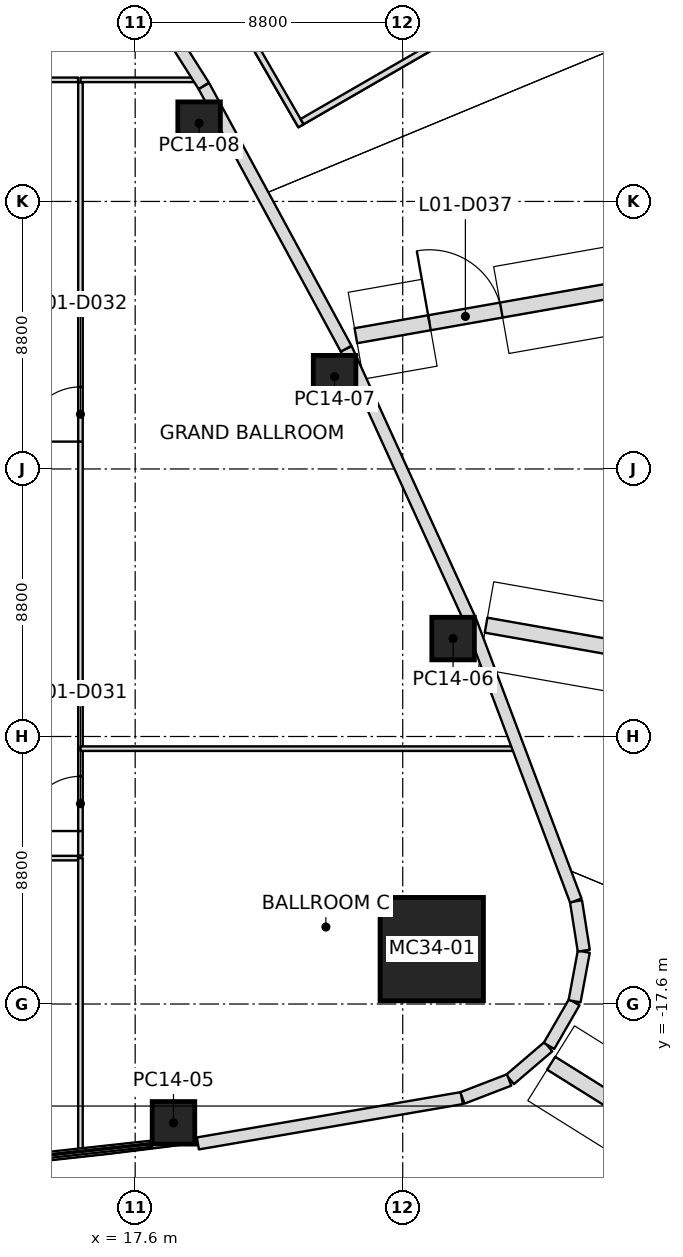
"""IFC4 building model, lengths in metres.
Left out: names, types, materials, properties, quantities, classifications, styles, units other than length and angle.
Written with IfcOpenShell. Run it as: python <this file> out.ifc"""

import sys

from ifc_helpers import new_model, si_unit, direction, frame, frame_2d, origin, origin_2d, place, context, subcontext, project, spatial, rectangle, extrude, element, fill, save


model = new_model("IFC4")
c1 = context("Model", 3, precision=1e-05, world=origin(), true_north=direction((0.0, 1.0)))
c2 = subcontext(c1, "Body", "Model", "MODEL_VIEW")
j1 = project(units=[si_unit("LENGTHUNIT", "METRE"), si_unit("PLANEANGLEUNIT", "RADIAN")], contexts=[c1])
p1 = place(None, origin())
s1 = spatial("IfcSite", under=j1, at=p1, CompositionType="ELEMENT")
p2 = place(p1, origin())
s2 = spatial("IfcBuilding", under=s1, at=p2, CompositionType="ELEMENT")
p3 = place(p2, frame((0.0, 0.0, 9.0)))
s3 = spatial("IfcBuildingStorey", under=s2, at=p3, CompositionType="ELEMENT", Elevation=9.0)
p4 = place(p3, frame((27.355, -15.793, 0.0), z_axis=(0.0, 0.0, 1.0), x_axis=(1.0, 0.0, 0.0)))
e1 = element("IfcColumn", 1, at=p4, inside=s3, PredefinedType="COLUMN", context=c2, shape_type="SweptSolid", body=[
    extrude(rectangle(XDim=3.4, YDim=3.4, at=origin_2d()), origin(), (0.0, 0.0, 1.0), 7.8),
])
for number, where, z_axis, x_axis in (
    (2, (18.86, -21.508, 0.0), (0.0, 0.0, 1.0), (0.991, 0.131, 0.0)),
    (3, (28.057, -5.579, 0.0), (0.0, 0.0, 1.0), (-0.382, 0.924, 0.0)),
    (4, (24.158, 3.035, 0.0), (0.0, 0.0, 1.0), (-0.442, 0.897, 0.0)),
    (5, (19.702, 11.375, 0.0), (0.0, 0.0, 1.0), (-0.5, 0.866, 0.0)),
):
    element("IfcColumn", number, at=place(p3, frame(where, z_axis=z_axis, x_axis=x_axis)), inside=s3, PredefinedType="COLUMN", context=c2, shape_type="SweptSolid", body=[
        extrude(rectangle(XDim=1.4, YDim=1.4, at=origin_2d()), origin(), (0.0, 0.0, 1.0), 7.8),
    ])
p5 = place(p3, frame((24.859, 4.383, -0.06), z_axis=(0.0, 0.0, 1.0), x_axis=(0.984806552883, 0.173654983803, 0.0)))
e6 = element("IfcWall", 6, at=p5, inside=s3, PredefinedType="STANDARD", context=c2, shape_type="SweptSolid", body=[
    extrude(rectangle(XDim=8.868, YDim=0.5, at=frame_2d((4.434, 0.0))), origin(), (0.0, 0.0, 1.0), 9.06),
])
p6 = place(p5, frame((2.458, 0.0, 0.06)))
e7 = element("IfcOpeningElement", 7, at=p6, cuts=e6, PredefinedType="OPENING", context=c2, shape_type="SweptSolid", body=[
    extrude(rectangle(XDim=2.4, YDim=3.0, at=frame_2d((1.2, 1.5))), frame((0.0, 0.25, 0.0), z_axis=(0.0, -1.0, 0.0), x_axis=(1.0, 0.0, 0.0)), (0.0, 0.0, 1.0), 0.5),
])
p7 = place(p3, frame((31.282, -19.547, -0.06), z_axis=(0.0, 0.0, 1.0), x_axis=(0.848049126922, -0.52991761466, 0.0)))
e8 = element("IfcWall", 8, at=p7, inside=s3, PredefinedType="STANDARD", context=c2, shape_type="SweptSolid", body=[
    extrude(rectangle(XDim=11.874, YDim=0.5, at=frame_2d((5.937, 0.0))), origin(), (0.0, 0.0, 1.0), 9.06),
])
p8 = place(p7, frame((3.6, 0.0, 0.06)))
e9 = element("IfcOpeningElement", 9, at=p8, cuts=e8, PredefinedType="OPENING", context=c2, shape_type="SweptSolid", body=[
    extrude(rectangle(XDim=2.4, YDim=3.0, at=frame_2d((1.2, 1.5))), frame((0.0, 0.25, 0.0), z_axis=(0.0, -1.0, 0.0), x_axis=(1.0, 0.0, 0.0)), (0.0, 0.0, 1.0), 0.5),
])
p9 = place(p3, frame((29.142, -5.138, -0.06), z_axis=(0.0, 0.0, 1.0), x_axis=(0.984807275936, -0.17365088328, 0.0)))
e10 = element("IfcWall", 10, at=p9, inside=s3, PredefinedType="STANDARD", context=c2, shape_type="SweptSolid", body=[
    extrude(rectangle(XDim=10.048, YDim=0.5, at=frame_2d((5.024, 0.0))), origin(), (0.0, 0.0, 1.0), 7.06),
])
p10 = place(p9, frame((4.436, 0.0, 0.06)))
e11 = element("IfcOpeningElement", 11, at=p10, cuts=e10, PredefinedType="OPENING", context=c2, shape_type="SweptSolid", body=[
    extrude(rectangle(XDim=2.4, YDim=3.0, at=frame_2d((1.2, 1.5))), frame((0.0, 0.25, 0.0), z_axis=(0.0, -1.0, 0.0), x_axis=(1.0, 0.0, 0.0)), (0.0, 0.0, 1.0), 0.5),
])
p11 = place(p3, frame((21.303, 14.32, 0.18), z_axis=(0.0, 0.0, 1.0), x_axis=(0.500062588897, -0.865989265052, 0.0)))
e12 = element("IfcWall", 12, at=p11, inside=s3, PredefinedType="STANDARD", context=c2, shape_type="SweptSolid", body=[
    extrude(rectangle(XDim=3.5, YDim=0.2, at=frame_2d((1.75, 0.0))), origin(), (0.0, 0.0, 1.0), 0.3),
])
p12 = place(p3, frame((23.09, 11.426, 0.18), z_axis=(0.0, 0.0, 1.0), x_axis=(0.866034573852, 0.49998411664, 0.0)))
e13 = element("IfcWall", 13, at=p12, inside=s3, PredefinedType="STANDARD", context=c2, shape_type="SweptSolid", body=[
    extrude(rectangle(XDim=5.6, YDim=0.2, at=frame_2d((2.8, 0.0))), origin(), (0.0, 0.0, 1.0), 0.3),
])
for number, where, z_axis, x_axis in (
    (14, (31.19, -19.003, 0.0), (0.0, 0.0, 1.0), (-0.76, -0.65, 0.0)),
    (15, (32.041, -17.541, 0.0), (0.0, 0.0, 1.0), (-0.5, -0.866, 0.0)),
    (16, (32.355, -15.878, 0.0), (0.0, 0.0, 1.0), (-0.183, -0.983, 0.0)),
):
    element("IfcWall", number, at=place(p3, frame(where, z_axis=z_axis, x_axis=x_axis)), inside=s3, PredefinedType="STANDARD", context=c2, shape_type="SweptSolid", body=[
        extrude(rectangle(XDim=1.659, YDim=0.4, at=frame_2d((0.829, 0.0))), origin(), (0.0, 0.0, 1.0), 6.9),
    ])
p13 = place(p3, frame((32.099, -14.219, 0.0), z_axis=(0.0, 0.0, 1.0), x_axis=(0.155711266073, -0.98780261268, 0.0)))
e17 = element("IfcWall", 17, at=p13, inside=s3, PredefinedType="STANDARD", context=c2, shape_type="SweptSolid", body=[
    extrude(rectangle(XDim=1.646, YDim=0.4, at=frame_2d((0.823, 0.0))), origin(), (0.0, 0.0, 1.0), 6.9),
])
p14 = place(p3, frame((28.625, -4.993, 0.0), z_axis=(0.0, 0.0, 1.0), x_axis=(0.352569865932, -0.935785493389, 0.0)))
e18 = element("IfcWall", 18, at=p14, inside=s3, PredefinedType="STANDARD", context=c2, shape_type="SweptSolid", body=[
    extrude(rectangle(XDim=9.838, YDim=0.4, at=frame_2d((4.919, 0.0))), origin(), (0.0, 0.0, 1.0), 6.9),
])
p15 = place(p3, frame((24.541, 3.951, 0.0), z_axis=(0.0, 0.0, 1.0), x_axis=(0.415399179946, -0.909639225902, 0.0)))
e19 = element("IfcWall", 19, at=p15, inside=s3, PredefinedType="STANDARD", context=c2, shape_type="SweptSolid", body=[
    extrude(rectangle(XDim=9.826, YDim=0.4, at=frame_2d((4.913, 0.0))), origin(), (0.0, 0.0, 1.0), 6.9),
])
p16 = place(p3, frame((19.859, 12.597, 0.0), z_axis=(0.0, 0.0, 1.0), x_axis=(0.476254331716, -0.879307575039, 0.0)))
e20 = element("IfcWall", 20, at=p16, inside=s3, PredefinedType="STANDARD", context=c2, shape_type="SweptSolid", body=[
    extrude(rectangle(XDim=9.825, YDim=0.4, at=frame_2d((4.913, 0.0))), origin(), (0.0, 0.0, 1.0), 6.9),
])
p17 = place(p3, frame((14.599, 20.905, 0.0), z_axis=(0.0, 0.0, 1.0), x_axis=(0.534912566476, -0.844907418731, 0.0)))
e21 = element("IfcWall", 21, at=p17, inside=s3, PredefinedType="STANDARD", context=c2, shape_type="SweptSolid", body=[
    extrude(rectangle(XDim=9.826, YDim=0.4, at=frame_2d((4.913, 0.0))), origin(), (0.0, 0.0, 1.0), 6.9),
])
p18 = place(p3, frame((28.344, -20.695, 0.0), z_axis=(0.0, 0.0, 1.0), x_axis=(-0.985570785174, -0.169263780566, 0.0)))
e22 = element("IfcWall", 22, at=p18, inside=s3, PredefinedType="STANDARD", context=c2, shape_type="SweptSolid", body=[
    extrude(rectangle(XDim=8.81, YDim=0.4, at=frame_2d((4.405, 0.0))), origin(), (0.0, 0.0, 1.0), 6.9),
])
p19 = place(p3, frame((29.9, -20.098, 0.0), z_axis=(0.0, 0.0, 1.0), x_axis=(-0.933315023429, -0.359058584415, 0.0)))
e23 = element("IfcWall", 23, at=p19, inside=s3, PredefinedType="STANDARD", context=c2, shape_type="SweptSolid", body=[
    extrude(rectangle(XDim=1.646, YDim=0.4, at=frame_2d((0.823, 0.0))), origin(), (0.0, 0.0, 1.0), 6.9),
])
p20 = place(p3, frame((15.8, -12.8, 0.0), z_axis=(0.0, 0.0, 1.0), x_axis=(0.0, -1.0, 0.0)))
e24 = element("IfcWall", 24, at=p20, inside=s3, PredefinedType="PARTITIONING", context=c2, shape_type="SweptSolid", body=[
    extrude(rectangle(XDim=9.71, YDim=0.15, at=frame_2d((4.855, 0.0))), origin(), (0.0, 0.0, 1.0), 6.934),
])
p21 = place(p3, frame((15.8, -9.2, 0.0), z_axis=(0.0, 0.0, 1.0), x_axis=(1.0, 0.0, 0.0)))
e25 = element("IfcWall", 25, at=p21, inside=s3, PredefinedType="PARTITIONING", context=c2, shape_type="SweptSolid", body=[
    extrude(rectangle(XDim=14.368, YDim=0.15, at=frame_2d((7.184, 0.0))), origin(), (0.0, 0.0, 1.0), 6.934),
])
p22 = place(p3, frame((19.598, 12.8, 0.0), z_axis=(0.0, 0.0, 1.0), x_axis=(-1.0, 0.0, 0.0)))
e26 = element("IfcWall", 26, at=p22, inside=s3, PredefinedType="PARTITIONING", context=c2, shape_type="SweptSolid", body=[
    extrude(rectangle(XDim=3.798, YDim=0.15, at=frame_2d((1.899, 0.0))), origin(), (0.0, 0.0, 1.0), 6.934),
])
p23 = place(p3, frame((-15.72, -12.8, 0.0), z_axis=(0.0, 0.0, 1.0), x_axis=(1.0, 0.0, 0.0)))
e27 = element("IfcWall", 27, at=p23, inside=s3, PredefinedType="PARTITIONING", context=c2, shape_type="SweptSolid", body=[
    extrude(rectangle(XDim=31.44, YDim=0.15, at=frame_2d((15.72, 0.0))), origin(), (0.0, 0.0, 1.0), 6.947),
])
p24 = place(p23, frame((1.52, 0.0, 0.0)))
e28 = element("IfcOpeningElement", 28, at=p24, cuts=e27, PredefinedType="OPENING", context=c2, shape_type="SweptSolid", body=[
    extrude(rectangle(XDim=1.0, YDim=2.1, at=frame_2d((0.5, 1.05))), frame((0.0, 0.075, 0.0), z_axis=(0.0, -1.0, 0.0), x_axis=(1.0, 0.0, 0.0)), (0.0, 0.0, 1.0), 0.15),
])
p25 = place(p23, frame((6.37, 0.0, 0.0)))
e29 = element("IfcOpeningElement", 29, at=p25, cuts=e27, PredefinedType="OPENING", context=c2, shape_type="SweptSolid", body=[
    extrude(rectangle(XDim=1.0, YDim=2.1, at=frame_2d((0.5, 1.05))), frame((0.0, 0.075, 0.0), z_axis=(0.0, -1.0, 0.0), x_axis=(1.0, 0.0, 0.0)), (0.0, 0.0, 1.0), 0.15),
])
p26 = place(p23, frame((20.02, 0.0, 0.0)))
e30 = element("IfcOpeningElement", 30, at=p26, cuts=e27, PredefinedType="OPENING", context=c2, shape_type="SweptSolid", body=[
    extrude(rectangle(XDim=1.0, YDim=2.1, at=frame_2d((0.5, 1.05))), frame((0.0, 0.075, 0.0), z_axis=(0.0, -1.0, 0.0), x_axis=(1.0, 0.0, 0.0)), (0.0, 0.0, 1.0), 0.15),
])
p27 = place(p3, frame((15.72, 12.8, 0.0), z_axis=(0.0, 0.0, 1.0), x_axis=(-1.0, 0.0, 0.0)))
e31 = element("IfcWall", 31, at=p27, inside=s3, PredefinedType="PARTITIONING", context=c2, shape_type="SweptSolid", body=[
    extrude(rectangle(XDim=31.44, YDim=0.15, at=frame_2d((15.72, 0.0))), origin(), (0.0, 0.0, 1.0), 6.647),
])
p28 = place(p27, frame((6.92, 0.0, 0.0)))
e32 = element("IfcOpeningElement", 32, at=p28, cuts=e31, PredefinedType="OPENING", context=c2, shape_type="SweptSolid", body=[
    extrude(rectangle(XDim=1.0, YDim=2.1, at=frame_2d((0.5, 1.05))), frame((0.0, 0.075, 0.0), z_axis=(0.0, -1.0, 0.0), x_axis=(1.0, 0.0, 0.0)), (0.0, 0.0, 1.0), 0.15),
])
p29 = place(p27, frame((1.66, 0.0, 0.0)))
e33 = element("IfcOpeningElement", 33, at=p29, cuts=e31, PredefinedType="OPENING", context=c2, shape_type="SweptSolid", body=[
    extrude(rectangle(XDim=1.8, YDim=2.1, at=frame_2d((0.9, 1.05))), frame((0.0, 0.075, 0.0), z_axis=(0.0, -1.0, 0.0), x_axis=(1.0, 0.0, 0.0)), (0.0, 0.0, 1.0), 0.15),
])
p30 = place(p27, frame((19.33, 0.0, 0.0)))
e34 = element("IfcOpeningElement", 34, at=p30, cuts=e31, PredefinedType="OPENING", context=c2, shape_type="SweptSolid", body=[
    extrude(rectangle(XDim=2.4, YDim=2.1, at=frame_2d((1.2, 1.05))), frame((0.0, 0.075, 0.0), z_axis=(0.0, -1.0, 0.0), x_axis=(1.0, 0.0, 0.0)), (0.0, 0.0, 1.0), 0.15),
])
p31 = place(p3, frame((15.8, -12.72, 0.0), z_axis=(0.0, 0.0, 1.0), x_axis=(0.0, 1.0, 0.0)))
e35 = element("IfcWall", 35, at=p31, inside=s3, PredefinedType="PARTITIONING", context=c2, shape_type="SweptSolid", body=[
    extrude(rectangle(XDim=25.44, YDim=0.15, at=frame_2d((12.72, 0.0))), origin(), (0.0, 0.0, 1.0), 6.647),
])
p32 = place(p31, frame((0.81, 0.0, 0.0)))
e36 = element("IfcOpeningElement", 36, at=p32, cuts=e35, PredefinedType="OPENING", context=c2, shape_type="SweptSolid", body=[
    extrude(rectangle(XDim=1.8, YDim=2.1, at=frame_2d((0.9, 1.05))), frame((0.0, 0.075, 0.0), z_axis=(0.0, -1.0, 0.0), x_axis=(1.0, 0.0, 0.0)), (0.0, 0.0, 1.0), 0.15),
])
p33 = place(p31, frame((13.62, 0.0, 0.0)))
e37 = element("IfcOpeningElement", 37, at=p33, cuts=e35, PredefinedType="OPENING", context=c2, shape_type="SweptSolid", body=[
    extrude(rectangle(XDim=1.8, YDim=2.1, at=frame_2d((0.9, 1.05))), frame((0.0, 0.075, 0.0), z_axis=(0.0, -1.0, 0.0), x_axis=(1.0, 0.0, 0.0)), (0.0, 0.0, 1.0), 0.15),
])
p34 = place(p6, origin())
e38 = element("IfcDoor", 38, at=p34, inside=s3, OperationType="DOUBLE_DOOR_SINGLE_SWING", PredefinedType="DOOR", context=c2, shape_type="SweptSolid", body=[
    extrude(rectangle(XDim=2.4, YDim=3.0, at=frame_2d((1.2, 1.5))), frame((0.0, 0.025, 0.0), z_axis=(0.0, -1.0, 0.0), x_axis=(1.0, 0.0, 0.0)), (0.0, 0.0, 1.0), 0.05),
])
fill(e7, e38)
p35 = place(p32, origin())
e39 = element("IfcDoor", 39, at=p35, inside=s3, OperationType="DOUBLE_DOOR_SINGLE_SWING", PredefinedType="DOOR", context=c2, shape_type="SweptSolid", body=[
    extrude(rectangle(XDim=1.8, YDim=2.1, at=frame_2d((0.9, 1.05))), frame((0.0, 0.025, 0.0), z_axis=(0.0, -1.0, 0.0), x_axis=(1.0, 0.0, 0.0)), (0.0, 0.0, 1.0), 0.05),
])
fill(e36, e39)
p36 = place(p33, origin())
e40 = element("IfcDoor", 40, at=p36, inside=s3, OperationType="DOUBLE_DOOR_SINGLE_SWING", PredefinedType="DOOR", context=c2, shape_type="SweptSolid", body=[
    extrude(rectangle(XDim=1.8, YDim=2.1, at=frame_2d((0.9, 1.05))), frame((0.0, 0.025, 0.0), z_axis=(0.0, -1.0, 0.0), x_axis=(1.0, 0.0, 0.0)), (0.0, 0.0, 1.0), 0.05),
])
fill(e37, e40)
save(model, sys.argv[1])
